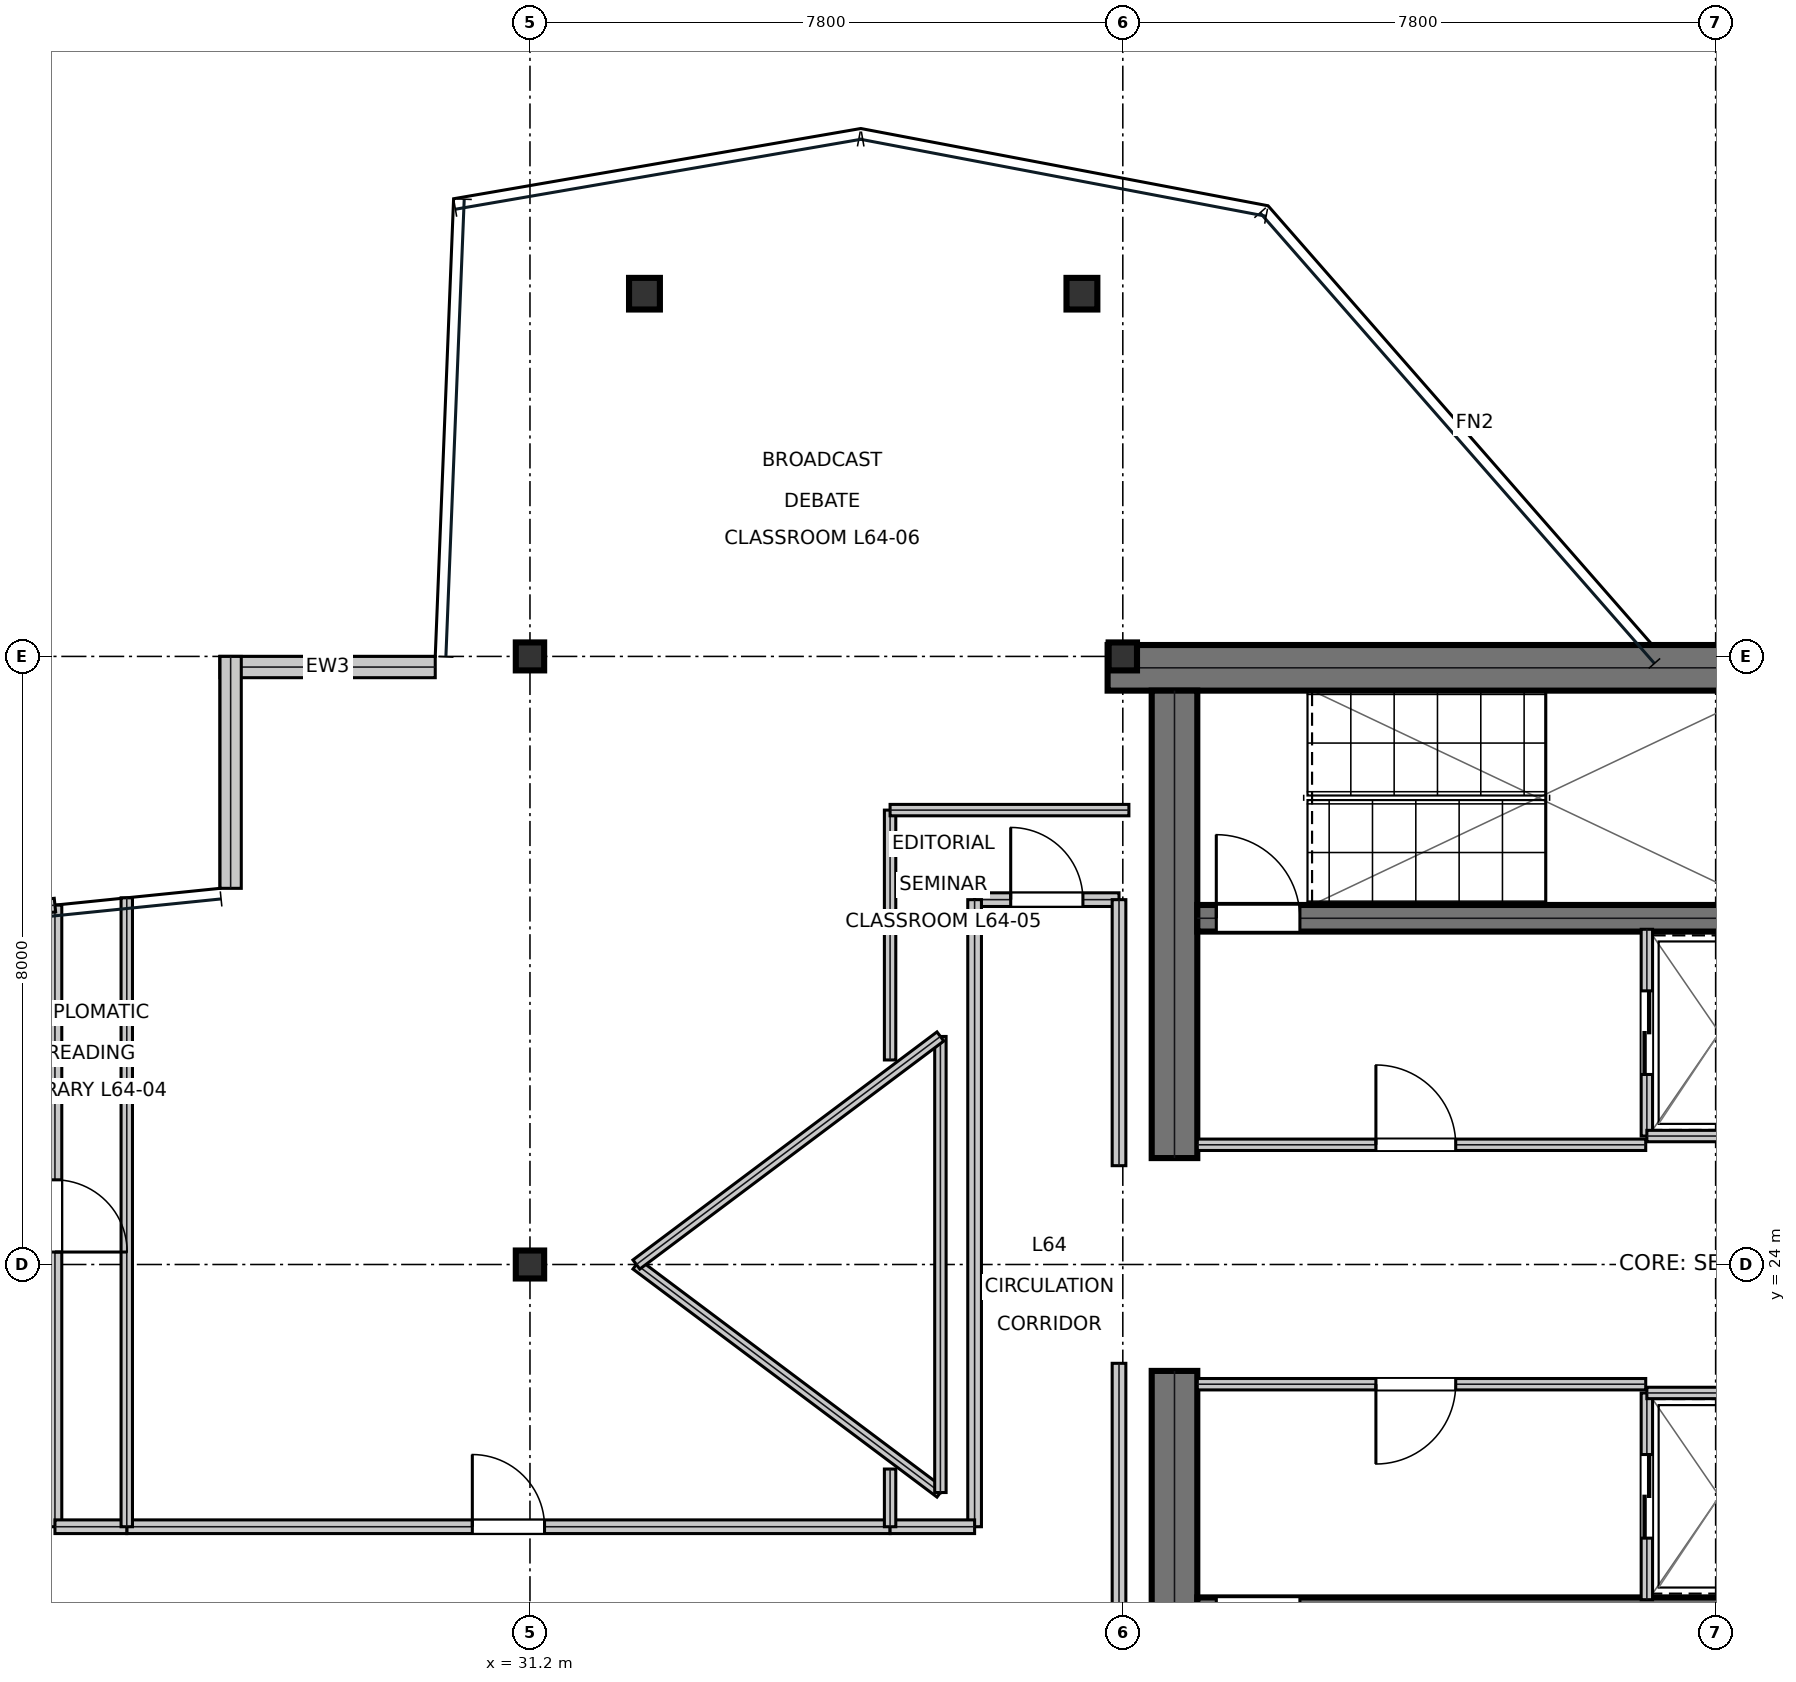
"""IFC4 building model, lengths in metres.
Left out: names, types, materials, properties, quantities, classifications, styles, units other than length and angle.
Written with IfcOpenShell. Run it as: python <this file> out.ifc"""

import sys

from ifc_helpers import new_model, si_unit, direction, frame, frame_2d, origin, origin_2d, place, context, subcontext, project, spatial, rectangle, i_section, extrude, element, fill, save


model = new_model("IFC4")
c1 = context("Model", 3, precision=1e-05, world=origin(), true_north=direction((0.0, 1.0)))
c2 = subcontext(c1, "Body", "Model", "MODEL_VIEW")
j1 = project(units=[si_unit("LENGTHUNIT", "METRE"), si_unit("PLANEANGLEUNIT", "RADIAN")], contexts=[c1])
p1 = place(None, origin())
s1 = spatial("IfcSite", under=j1, at=p1, CompositionType="ELEMENT")
p2 = place(p1, origin())
s2 = spatial("IfcBuilding", under=s1, at=p2, CompositionType="ELEMENT")
p3 = place(p2, frame((0.0, 0.0, 274.95)))
s3 = spatial("IfcBuildingStorey", under=s2, at=p3, CompositionType="ELEMENT", Elevation=274.95)
p4 = place(p3, frame((38.8, 31.85, 0.0), z_axis=(0.0, 0.0, 1.0), x_axis=(1.0, 0.0, 0.0)))
e1 = element("IfcWall", 1, at=p4, inside=s3, PredefinedType="SHEAR", context=c2, shape_type="SweptSolid", body=[
    extrude(rectangle(XDim=16.0, YDim=0.6, at=frame_2d((8.0, 0.0))), origin(), (0.0, 0.0, 1.0), 3.81),
])
for number, where, z_axis, x_axis in (
    (2, (39.68, 16.45, 0.0), (0.0, 0.0, 1.0), (0.0, 1.0, 0.0)),
    (3, (39.68, 25.4, 0.0), (0.0, 0.0, 1.0), (0.0, 1.0, 0.0)),
):
    element("IfcWall", number, at=place(p3, frame(where, z_axis=z_axis, x_axis=x_axis)), inside=s3, PredefinedType="SHEAR", context=c2, shape_type="SweptSolid", body=[
        extrude(rectangle(XDim=6.15, YDim=0.6, at=frame_2d((3.075, 0.0))), origin(), (0.0, 0.0, 1.0), 3.81),
    ])
p5 = place(p3, frame((39.98, 28.555, 0.0), z_axis=(0.0, 0.0, 1.0), x_axis=(1.0, 0.0, 0.0)))
e4 = element("IfcWall", 4, at=p5, inside=s3, PredefinedType="SHEAR", context=c2, shape_type="SweptSolid", body=[
    extrude(rectangle(XDim=7.71, YDim=0.35, at=frame_2d((3.855, 0.0))), origin(), (0.0, 0.0, 1.0), 3.81),
])
p6 = place(p5, frame((0.25, 0.0, 0.0)))
e5 = element("IfcOpeningElement", 5, at=p6, cuts=e4, PredefinedType="OPENING", context=c2, shape_type="SweptSolid", body=[
    extrude(rectangle(XDim=1.1, YDim=2.15, at=frame_2d((0.55, 1.075))), frame((0.0, 0.185, 0.0), z_axis=(0.0, -1.0, 0.0), x_axis=(1.0, 0.0, 0.0)), (0.0, 0.0, 1.0), 0.37),
])
p7 = place(p3, frame((39.98, 19.445, 0.0), z_axis=(0.0, 0.0, 1.0), x_axis=(1.0, 0.0, 0.0)))
e6 = element("IfcWall", 6, at=p7, inside=s3, PredefinedType="SHEAR", context=c2, shape_type="SweptSolid", body=[
    extrude(rectangle(XDim=7.71, YDim=0.35, at=frame_2d((3.855, 0.0))), origin(), (0.0, 0.0, 1.0), 3.81),
])
p8 = place(p7, frame((0.25, 0.0, 0.0)))
e7 = element("IfcOpeningElement", 7, at=p8, cuts=e6, PredefinedType="OPENING", context=c2, shape_type="SweptSolid", body=[
    extrude(rectangle(XDim=1.1, YDim=2.15, at=frame_2d((0.55, 1.075))), frame((0.0, 0.185, 0.0), z_axis=(0.0, -1.0, 0.0), x_axis=(1.0, 0.0, 0.0)), (0.0, 0.0, 1.0), 0.37),
])
for number, where, z_axis, x_axis in (
    (8, (31.2, 24.0, 0.0), (0.0, 0.0, 1.0), (1.0, 0.0, 0.0)),
    (9, (31.2, 32.0, 0.0), (0.0, 0.0, 1.0), (1.0, 0.0, 0.0)),
    (10, (39.0, 32.0, 0.0), (0.0, 0.0, 1.0), (1.0, 0.0, 0.0)),
):
    element("IfcColumn", number, at=place(p3, frame(where, z_axis=z_axis, x_axis=x_axis)), inside=s3, PredefinedType="COLUMN", context=c2, shape_type="SweptSolid", body=[
        extrude(i_section(OverallWidth=0.373, OverallDepth=0.368, WebThickness=0.015, FlangeThickness=0.024, at=origin_2d()), origin(), (0.0, 0.0, 1.0), 4.044),
    ])
p9 = place(p3, frame((32.706, 36.772, 0.016), z_axis=(0.013968236766, -0.029819148922, 0.999457706318), x_axis=(0.905569653976, 0.424197597586, 0.0)))
e11 = element("IfcColumn", 11, at=p9, inside=s3, PredefinedType="COLUMN", context=c2, shape_type="SweptSolid", body=[
    extrude(i_section(OverallWidth=0.406, OverallDepth=0.416, WebThickness=0.03, FlangeThickness=0.048, at=origin_2d()), origin(), (0.0, 0.0, 1.0), 4.02),
])
p10 = place(p3, frame((38.462, 36.772, 0.016), z_axis=(-0.004980404192, -0.029821688517, 0.99954282673), x_axis=(0.986339577116, -0.164724735893, 0.0)))
e12 = element("IfcColumn", 12, at=p10, inside=s3, PredefinedType="COLUMN", context=c2, shape_type="SweptSolid", body=[
    extrude(i_section(OverallWidth=0.406, OverallDepth=0.416, WebThickness=0.03, FlangeThickness=0.048, at=origin_2d()), origin(), (0.0, 0.0, 1.0), 4.02),
])
p11 = place(p3, frame((29.954, 31.86, 0.0), z_axis=(0.0, 0.0, 1.0), x_axis=(-1.0, 0.0, 0.0)))
e13 = element("IfcWall", 13, at=p11, inside=s3, PredefinedType="STANDARD", context=c2, shape_type="SweptSolid", body=[
    extrude(rectangle(XDim=2.832, YDim=0.28, at=frame_2d((1.416, 0.0))), origin(), (0.0, 0.0, 1.0), 3.81),
])
p12 = place(p3, frame((27.262, 32.0, 0.0), z_axis=(0.0, 0.0, 1.0), x_axis=(0.0, -1.0, 0.0)))
e14 = element("IfcWall", 14, at=p12, inside=s3, PredefinedType="STANDARD", context=c2, shape_type="SweptSolid", body=[
    extrude(rectangle(XDim=3.051, YDim=0.28, at=frame_2d((1.526, 0.0))), origin(), (0.0, 0.0, 1.0), 3.339),
])
p13 = place(p3, frame((39.98, 25.575, 0.0), z_axis=(0.0, 0.0, 1.0), x_axis=(1.0, 0.0, 0.0)))
e15 = element("IfcWall", 15, at=p13, inside=s3, PredefinedType="PARTITIONING", context=c2, shape_type="SweptSolid", body=[
    extrude(rectangle(XDim=5.9, YDim=0.15, at=frame_2d((2.95, 0.0))), origin(), (0.0, 0.0, 1.0), 3.81),
])
p14 = place(p13, frame((2.35, 0.0, 0.0)))
e16 = element("IfcOpeningElement", 16, at=p14, cuts=e15, PredefinedType="OPENING", context=c2, shape_type="SweptSolid", body=[
    extrude(rectangle(XDim=1.05, YDim=2.15, at=frame_2d((0.525, 1.075))), frame((0.0, 0.085, 0.0), z_axis=(0.0, -1.0, 0.0), x_axis=(1.0, 0.0, 0.0)), (0.0, 0.0, 1.0), 0.17),
])
p15 = place(p3, frame((39.98, 22.425, 0.0), z_axis=(0.0, 0.0, 1.0), x_axis=(1.0, 0.0, 0.0)))
e17 = element("IfcWall", 17, at=p15, inside=s3, PredefinedType="PARTITIONING", context=c2, shape_type="SweptSolid", body=[
    extrude(rectangle(XDim=5.9, YDim=0.15, at=frame_2d((2.95, 0.0))), origin(), (0.0, 0.0, 1.0), 3.81),
])
p16 = place(p15, frame((2.35, 0.0, 0.0)))
e18 = element("IfcOpeningElement", 18, at=p16, cuts=e17, PredefinedType="OPENING", context=c2, shape_type="SweptSolid", body=[
    extrude(rectangle(XDim=1.05, YDim=2.15, at=frame_2d((0.525, 1.075))), frame((0.0, 0.085, 0.0), z_axis=(0.0, -1.0, 0.0), x_axis=(1.0, 0.0, 0.0)), (0.0, 0.0, 1.0), 0.17),
])
p17 = place(p3, frame((45.895, 25.69, 0.0), z_axis=(0.0, 0.0, 1.0), x_axis=(0.0, 1.0, 0.0)))
e19 = element("IfcWall", 19, at=p17, inside=s3, PredefinedType="PARTITIONING", context=c2, shape_type="SweptSolid", body=[
    extrude(rectangle(XDim=2.72, YDim=0.15, at=frame_2d((1.36, 0.0))), origin(), (0.0, 0.0, 1.0), 3.81),
])
p18 = place(p17, frame((0.81, 0.0, 0.0)))
e20 = element("IfcOpeningElement", 20, at=p18, cuts=e19, PredefinedType="OPENING", context=c2, shape_type="SweptSolid", body=[
    extrude(rectangle(XDim=1.1, YDim=2.15, at=frame_2d((0.55, 1.075))), frame((0.0, 0.085, 0.0), z_axis=(0.0, -1.0, 0.0), x_axis=(1.0, 0.0, 0.0)), (0.0, 0.0, 1.0), 0.17),
])
p19 = place(p3, frame((45.895, 25.69, 0.0), z_axis=(0.0, 0.0, 1.0), x_axis=(1.0, 0.0, 0.0)))
e21 = element("IfcWall", 21, at=p19, inside=s3, PredefinedType="PARTITIONING", context=c2, shape_type="SweptSolid", body=[
    extrude(rectangle(XDim=1.915, YDim=0.15, at=frame_2d((0.958, 0.0))), origin(), (0.0, 0.0, 1.0), 3.81),
])
p20 = place(p3, frame((45.895, 19.59, 0.0), z_axis=(0.0, 0.0, 1.0), x_axis=(0.0, 1.0, 0.0)))
e22 = element("IfcWall", 22, at=p20, inside=s3, PredefinedType="PARTITIONING", context=c2, shape_type="SweptSolid", body=[
    extrude(rectangle(XDim=2.72, YDim=0.15, at=frame_2d((1.36, 0.0))), origin(), (0.0, 0.0, 1.0), 3.81),
])
p21 = place(p20, frame((0.81, 0.0, 0.0)))
e23 = element("IfcOpeningElement", 23, at=p21, cuts=e22, PredefinedType="OPENING", context=c2, shape_type="SweptSolid", body=[
    extrude(rectangle(XDim=1.1, YDim=2.15, at=frame_2d((0.55, 1.075))), frame((0.0, 0.085, 0.0), z_axis=(0.0, -1.0, 0.0), x_axis=(1.0, 0.0, 0.0)), (0.0, 0.0, 1.0), 0.17),
])
p22 = place(p3, frame((45.895, 22.31, 0.0), z_axis=(0.0, 0.0, 1.0), x_axis=(1.0, 0.0, 0.0)))
e24 = element("IfcWall", 24, at=p22, inside=s3, PredefinedType="PARTITIONING", context=c2, shape_type="SweptSolid", body=[
    extrude(rectangle(XDim=1.915, YDim=0.15, at=frame_2d((0.958, 0.0))), origin(), (0.0, 0.0, 1.0), 3.81),
])
p23 = place(p3, frame((24.95, 20.55, 0.0), z_axis=(0.0, 0.0, 1.0), x_axis=(0.0, 1.0, 0.0)))
e25 = element("IfcWall", 25, at=p23, inside=s3, PredefinedType="SOLIDWALL", context=c2, shape_type="SweptSolid", body=[
    extrude(rectangle(XDim=8.178, YDim=0.18, at=frame_2d((4.089, 0.0))), origin(), (0.0, 0.0, 1.0), 3.27),
])
p24 = place(p23, frame((3.614, 0.0, 0.0)))
e26 = element("IfcOpeningElement", 26, at=p24, cuts=e25, PredefinedType="OPENING", context=c2, shape_type="SweptSolid", body=[
    extrude(rectangle(XDim=0.95, YDim=2.15, at=frame_2d((0.475, 1.075))), frame((0.0, 0.1, 0.0), z_axis=(0.0, -1.0, 0.0), x_axis=(1.0, 0.0, 0.0)), (0.0, 0.0, 1.0), 0.2),
])
p25 = place(p3, frame((37.05, 28.8, 0.0), z_axis=(0.0, 0.0, 1.0), x_axis=(1.0, 0.0, 0.0)))
e27 = element("IfcWall", 27, at=p25, inside=s3, PredefinedType="SOLIDWALL", context=c2, shape_type="SweptSolid", body=[
    extrude(rectangle(XDim=1.9, YDim=0.18, at=frame_2d((0.95, 0.0))), origin(), (0.0, 0.0, 1.0), 3.81),
])
p26 = place(p25, frame((0.475, 0.0, 0.0)))
e28 = element("IfcOpeningElement", 28, at=p26, cuts=e27, PredefinedType="OPENING", context=c2, shape_type="SweptSolid", body=[
    extrude(rectangle(XDim=0.95, YDim=2.15, at=frame_2d((0.475, 1.075))), frame((0.0, 0.1, 0.0), z_axis=(0.0, -1.0, 0.0), x_axis=(1.0, 0.0, 0.0)), (0.0, 0.0, 1.0), 0.2),
])
p27 = place(p3, frame((25.895, 20.55, 0.0), z_axis=(0.0, 0.0, 1.0), x_axis=(1.0, 0.0, 0.0)))
e29 = element("IfcWall", 29, at=p27, inside=s3, PredefinedType="SOLIDWALL", context=c2, shape_type="SweptSolid", body=[
    extrude(rectangle(XDim=10.043, YDim=0.18, at=frame_2d((5.021, 0.0))), origin(), (0.0, 0.0, 1.0), 3.27),
])
p28 = place(p27, frame((4.546, 0.0, 0.0)))
e30 = element("IfcOpeningElement", 30, at=p28, cuts=e29, PredefinedType="OPENING", context=c2, shape_type="SweptSolid", body=[
    extrude(rectangle(XDim=0.95, YDim=2.15, at=frame_2d((0.475, 1.075))), frame((0.0, 0.1, 0.0), z_axis=(0.0, -1.0, 0.0), x_axis=(1.0, 0.0, 0.0)), (0.0, 0.0, 1.0), 0.2),
])
p29 = place(p3, frame((38.95, 18.8, 0.0), z_axis=(0.0, 0.0, 1.0), x_axis=(0.0, 1.0, 0.0)))
e31 = element("IfcWall", 31, at=p29, inside=s3, PredefinedType="SOLIDWALL", context=c2, shape_type="SweptSolid", body=[
    extrude(rectangle(XDim=3.9, YDim=0.18, at=frame_2d((1.95, 0.0))), origin(), (0.0, 0.0, 1.0), 3.54),
])
p30 = place(p3, frame((23.872, 28.618, 0.0), z_axis=(0.0, 0.0, 1.0), x_axis=(0.994866145346, 0.101199569384, 0.0)))
e32 = element("IfcWall", 32, at=p30, inside=s3, PredefinedType="SOLIDWALL", context=c2, shape_type="SweptSolid", body=[
    extrude(rectangle(XDim=1.083, YDim=0.18, at=frame_2d((0.542, 0.0))), origin(), (0.0, 0.0, 1.0), 3.81),
])
p31 = place(p3, frame((24.95, 20.55, 0.0), z_axis=(0.0, 0.0, 1.0), x_axis=(1.0, 0.0, 0.0)))
e33 = element("IfcWall", 33, at=p31, inside=s3, PredefinedType="SOLIDWALL", context=c2, shape_type="SweptSolid", body=[
    extrude(rectangle(XDim=0.945, YDim=0.18, at=frame_2d((0.473, 0.0))), origin(), (0.0, 0.0, 1.0), 3.81),
])
p32 = place(p3, frame((37.05, 20.55, 0.0), z_axis=(0.0, 0.0, 1.0), x_axis=(0.0, 1.0, 0.0)))
e34 = element("IfcWall", 34, at=p32, inside=s3, PredefinedType="SOLIDWALL", context=c2, shape_type="SweptSolid", body=[
    extrude(rectangle(XDim=8.25, YDim=0.18, at=frame_2d((4.125, 0.0))), origin(), (0.0, 0.0, 1.0), 3.54),
])
p33 = place(p3, frame((38.95, 25.3, 0.0), z_axis=(0.0, 0.0, 1.0), x_axis=(0.0, 1.0, 0.0)))
e35 = element("IfcWall", 35, at=p33, inside=s3, PredefinedType="SOLIDWALL", context=c2, shape_type="SweptSolid", body=[
    extrude(rectangle(XDim=3.5, YDim=0.18, at=frame_2d((1.75, 0.0))), origin(), (0.0, 0.0, 1.0), 3.54),
])
p34 = place(p3, frame((35.938, 20.55, 0.0), z_axis=(0.0, 0.0, 1.0), x_axis=(1.0, 0.0, 0.0)))
e36 = element("IfcWall", 36, at=p34, inside=s3, PredefinedType="SOLIDWALL", context=c2, shape_type="SweptSolid", body=[
    extrude(rectangle(XDim=1.112, YDim=0.18, at=frame_2d((0.556, 0.0))), origin(), (0.0, 0.0, 1.0), 3.54),
])
p35 = place(p3, frame((25.895, 20.55, 0.0), z_axis=(0.0, 0.0, 1.0), x_axis=(0.0, 1.0, 0.0)))
e37 = element("IfcWall", 37, at=p35, inside=s3, PredefinedType="MOVABLE", context=c2, shape_type="SweptSolid", body=[
    extrude(rectangle(XDim=8.274, YDim=0.15, at=frame_2d((4.137, 0.0))), origin(), (0.0, 0.0, 1.0), 3.27),
])
p36 = place(p3, frame((35.938, 26.691, 0.0), z_axis=(0.0, 0.0, 1.0), x_axis=(0.0, 1.0, 0.0)))
e38 = element("IfcWall", 38, at=p36, inside=s3, PredefinedType="MOVABLE", context=c2, shape_type="SweptSolid", body=[
    extrude(rectangle(XDim=3.287, YDim=0.15, at=frame_2d((1.644, 0.0))), origin(), (0.0, 0.0, 1.0), 3.54),
])
p37 = place(p3, frame((35.938, 29.978, 0.0), z_axis=(0.0, 0.0, 1.0), x_axis=(1.0, 0.0, 0.0)))
e39 = element("IfcWall", 39, at=p37, inside=s3, PredefinedType="MOVABLE", context=c2, shape_type="SweptSolid", body=[
    extrude(rectangle(XDim=3.142, YDim=0.15, at=frame_2d((1.571, 0.0))), origin(), (0.0, 0.0, 1.0), 3.54),
])
p38 = place(p3, frame((35.938, 20.55, 0.0), z_axis=(0.0, 0.0, 1.0), x_axis=(0.0, 1.0, 0.0)))
e40 = element("IfcWall", 40, at=p38, inside=s3, PredefinedType="MOVABLE", context=c2, shape_type="SweptSolid", body=[
    extrude(rectangle(XDim=0.759, YDim=0.15, at=frame_2d((0.379, 0.0))), origin(), (0.0, 0.0, 1.0), 3.81),
])
p39 = place(p3, frame((32.6, 24.0, 0.0), z_axis=(0.0, 0.0, 1.0), x_axis=(0.8, -0.6, 0.0)))
e41 = element("IfcWall", 41, at=p39, inside=s3, PredefinedType="MOVABLE", context=c2, shape_type="SweptSolid", body=[
    extrude(rectangle(XDim=5.0, YDim=0.15, at=frame_2d((2.5, 0.0))), origin(), (0.0, 0.0, 1.0), 3.81),
])
p40 = place(p3, frame((36.6, 21.0, 0.0), z_axis=(0.0, 0.0, 1.0), x_axis=(0.0, 1.0, 0.0)))
e42 = element("IfcWall", 42, at=p40, inside=s3, PredefinedType="MOVABLE", context=c2, shape_type="SweptSolid", body=[
    extrude(rectangle(XDim=6.0, YDim=0.15, at=frame_2d((3.0, 0.0))), origin(), (0.0, 0.0, 1.0), 3.81),
])
p41 = place(p3, frame((36.6, 27.0, 0.0), z_axis=(0.0, 0.0, 1.0), x_axis=(-0.8, -0.6, 0.0)))
e43 = element("IfcWall", 43, at=p41, inside=s3, PredefinedType="MOVABLE", context=c2, shape_type="SweptSolid", body=[
    extrude(rectangle(XDim=5.0, YDim=0.15, at=frame_2d((2.5, 0.0))), origin(), (0.0, 0.0, 1.0), 3.81),
])
p42 = place(p14, origin())
e44 = element("IfcDoor", 44, at=p42, inside=s3, OperationType="SINGLE_SWING_LEFT", PredefinedType="DOOR", context=c2, shape_type="SweptSolid", body=[
    extrude(rectangle(XDim=1.05, YDim=2.15, at=frame_2d((0.525, 1.075))), frame((0.0, 0.025, 0.0), z_axis=(0.0, -1.0, 0.0), x_axis=(1.0, 0.0, 0.0)), (0.0, 0.0, 1.0), 0.05),
])
fill(e16, e44)
p43 = place(p16, frame((1.05, 0.0, 0.0), z_axis=(0.0, 0.0, 1.0), x_axis=(-1.0, 0.0, 0.0)))
e45 = element("IfcDoor", 45, at=p43, inside=s3, OperationType="SINGLE_SWING_RIGHT", PredefinedType="DOOR", context=c2, shape_type="SweptSolid", body=[
    extrude(rectangle(XDim=1.05, YDim=2.15, at=frame_2d((0.525, 1.075))), frame((0.0, 0.025, 0.0), z_axis=(0.0, -1.0, 0.0), x_axis=(1.0, 0.0, 0.0)), (0.0, 0.0, 1.0), 0.05),
])
fill(e18, e45)
p44 = place(p18, frame((1.1, 0.0, 0.0), z_axis=(0.0, 0.0, 1.0), x_axis=(-1.0, 0.0, 0.0)))
e46 = element("IfcDoor", 46, at=p44, inside=s3, OperationType="DOUBLE_DOOR_SLIDING", PredefinedType="DOOR", context=c2, shape_type="SweptSolid", body=[
    extrude(rectangle(XDim=1.1, YDim=2.15, at=frame_2d((0.55, 1.075))), frame((0.0, 0.025, 0.0), z_axis=(0.0, -1.0, 0.0), x_axis=(1.0, 0.0, 0.0)), (0.0, 0.0, 1.0), 0.05),
])
fill(e20, e46)
p45 = place(p21, frame((1.1, 0.0, 0.0), z_axis=(0.0, 0.0, 1.0), x_axis=(-1.0, 0.0, 0.0)))
e47 = element("IfcDoor", 47, at=p45, inside=s3, OperationType="DOUBLE_DOOR_SLIDING", PredefinedType="DOOR", context=c2, shape_type="SweptSolid", body=[
    extrude(rectangle(XDim=1.1, YDim=2.15, at=frame_2d((0.55, 1.075))), frame((0.0, 0.025, 0.0), z_axis=(0.0, -1.0, 0.0), x_axis=(1.0, 0.0, 0.0)), (0.0, 0.0, 1.0), 0.05),
])
fill(e23, e47)
p46 = place(p24, frame((0.95, 0.0, 0.0), z_axis=(0.0, 0.0, 1.0), x_axis=(-1.0, 0.0, 0.0)))
e48 = element("IfcDoor", 48, at=p46, inside=s3, OperationType="SINGLE_SWING_RIGHT", PredefinedType="DOOR", context=c2, shape_type="SweptSolid", body=[
    extrude(rectangle(XDim=0.95, YDim=2.15, at=frame_2d((0.475, 1.075))), frame((0.0, 0.025, 0.0), z_axis=(0.0, -1.0, 0.0), x_axis=(1.0, 0.0, 0.0)), (0.0, 0.0, 1.0), 0.05),
])
fill(e26, e48)
p47 = place(p26, origin())
e49 = element("IfcDoor", 49, at=p47, inside=s3, OperationType="SINGLE_SWING_LEFT", PredefinedType="DOOR", context=c2, shape_type="SweptSolid", body=[
    extrude(rectangle(XDim=0.95, YDim=2.15, at=frame_2d((0.475, 1.075))), frame((0.0, 0.025, 0.0), z_axis=(0.0, -1.0, 0.0), x_axis=(1.0, 0.0, 0.0)), (0.0, 0.0, 1.0), 0.05),
])
fill(e28, e49)
p48 = place(p28, origin())
e50 = element("IfcDoor", 50, at=p48, inside=s3, OperationType="SINGLE_SWING_LEFT", PredefinedType="DOOR", context=c2, shape_type="SweptSolid", body=[
    extrude(rectangle(XDim=0.95, YDim=2.15, at=frame_2d((0.475, 1.075))), frame((0.0, 0.025, 0.0), z_axis=(0.0, -1.0, 0.0), x_axis=(1.0, 0.0, 0.0)), (0.0, 0.0, 1.0), 0.05),
])
fill(e30, e50)
p49 = place(p6, origin())
e51 = element("IfcDoor", 51, at=p49, inside=s3, OperationType="SINGLE_SWING_LEFT", PredefinedType="DOOR", context=c2, shape_type="SweptSolid", body=[
    extrude(rectangle(XDim=1.1, YDim=2.15, at=frame_2d((0.55, 1.075))), frame((0.0, 0.025, 0.0), z_axis=(0.0, -1.0, 0.0), x_axis=(1.0, 0.0, 0.0)), (0.0, 0.0, 1.0), 0.05),
])
fill(e5, e51)
save(model, sys.argv[1])
